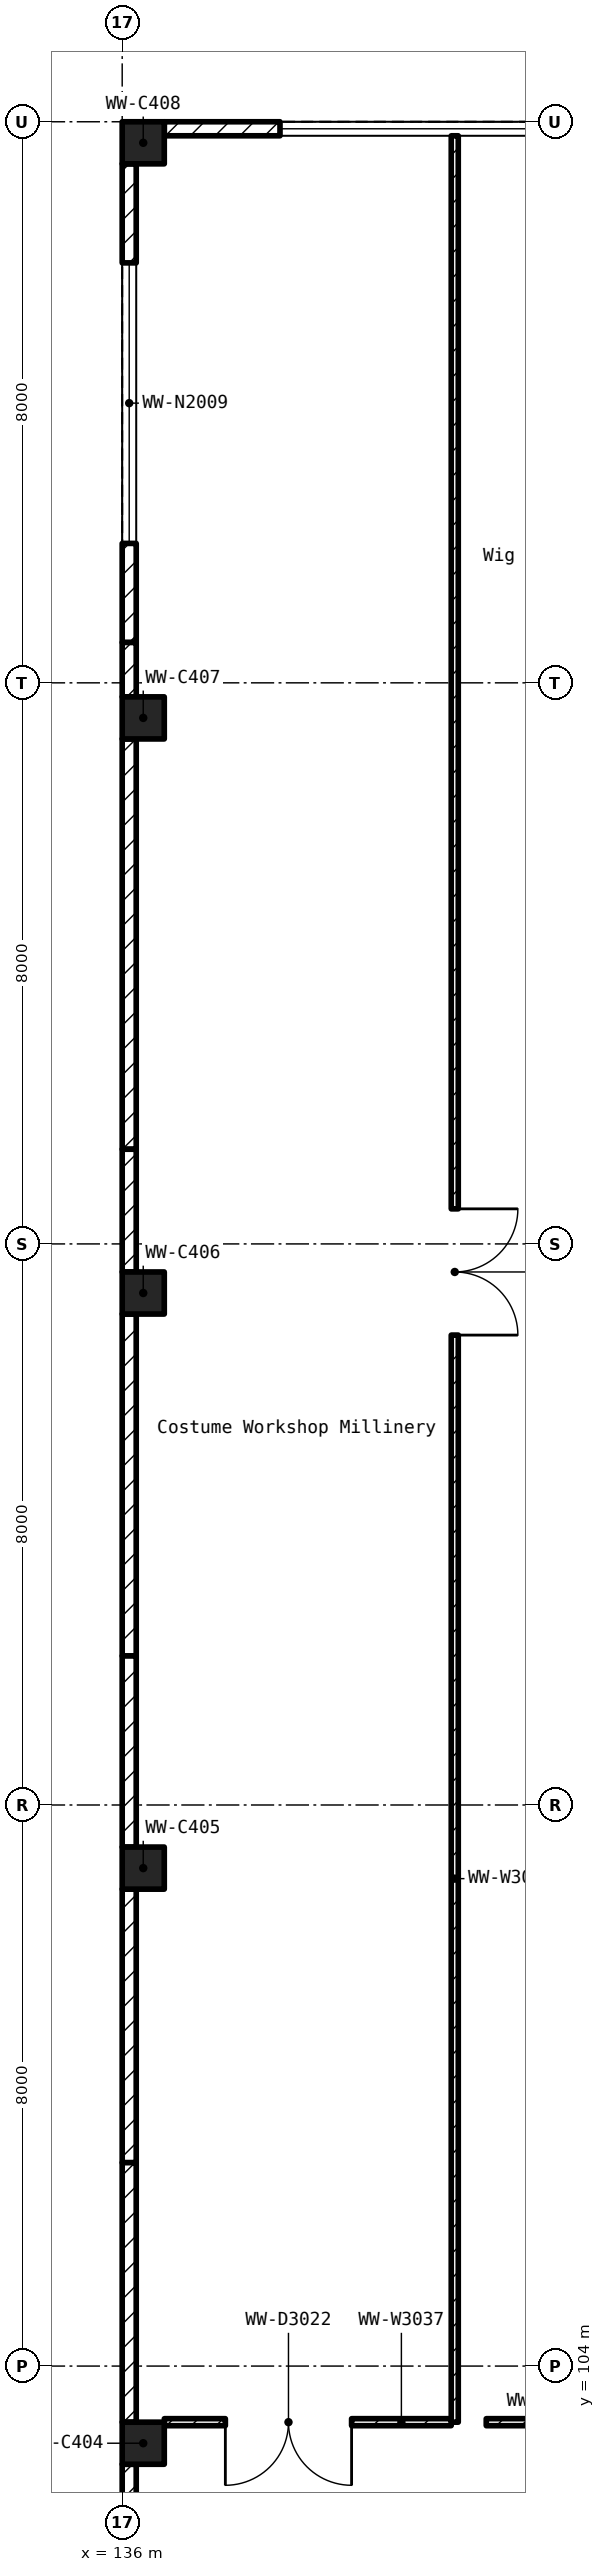
"""IFC4 building model, lengths in metres.
Left out: names, types, materials, properties, quantities, classifications, styles, units other than length and angle.
Written with IfcOpenShell. Run it as: python <this file> out.ifc"""

import sys

from ifc_helpers import new_model, si_unit, direction, frame, frame_2d, origin, origin_2d, place, context, subcontext, project, spatial, rectangle, extrude, element, fill, save


model = new_model("IFC4")
c1 = context("Model", 3, precision=1e-05, world=origin(), true_north=direction((0.0, 1.0)))
c2 = subcontext(c1, "Body", "Model", "MODEL_VIEW")
j1 = project(units=[si_unit("LENGTHUNIT", "METRE"), si_unit("PLANEANGLEUNIT", "RADIAN")], contexts=[c1])
p1 = place(None, origin())
s1 = spatial("IfcSite", under=j1, at=p1, CompositionType="ELEMENT")
p2 = place(p1, origin())
s2 = spatial("IfcBuilding", under=s1, at=p2, CompositionType="ELEMENT")
p3 = place(p2, frame((0.0, 0.0, 6.0)))
s3 = spatial("IfcBuildingStorey", under=s2, at=p3, CompositionType="ELEMENT", Elevation=6.0)
for number, where, z_axis, x_axis in (
    (1, (136.3, 102.9, 0.0), (0.0, 0.0, 1.0), (1.0, 0.0, 0.0)),
    (2, (136.3, 111.1, 0.0), (0.0, 0.0, 1.0), (1.0, 0.0, 0.0)),
    (3, (136.3, 119.3, 0.0), (0.0, 0.0, 1.0), (1.0, 0.0, 0.0)),
    (4, (136.3, 127.5, 0.0), (0.0, 0.0, 1.0), (1.0, 0.0, 0.0)),
    (5, (136.3, 135.7, 0.0), (0.0, 0.0, 1.0), (1.0, 0.0, 0.0)),
):
    element("IfcColumn", number, at=place(p3, frame(where, z_axis=z_axis, x_axis=x_axis)), inside=s3, PredefinedType="COLUMN", context=c2, shape_type="SweptSolid", body=[
        extrude(rectangle(XDim=0.6, YDim=0.6, at=origin_2d()), origin(), (0.0, 0.0, 1.0), 5.5),
    ])
p4 = place(p3, frame((143.9, 135.9, 0.0), z_axis=(0.0, 0.0, 1.0), x_axis=(-1.0, 0.0, 0.0)))
e6 = element("IfcWall", 6, at=p4, inside=s3, PredefinedType="SOLIDWALL", context=c2, shape_type="SweptSolid", body=[
    extrude(rectangle(XDim=7.3, YDim=0.2, at=frame_2d((3.65, 0.0))), origin(), (0.0, 0.0, 1.0), 4.55),
])
p5 = place(p4, frame((1.65, 0.0, 1.0)))
e7 = element("IfcOpeningElement", 7, at=p5, cuts=e6, PredefinedType="OPENING", context=c2, shape_type="SweptSolid", body=[
    extrude(rectangle(XDim=4.0, YDim=1.8, at=frame_2d((2.0, 0.9))), frame((0.0, 0.112, 0.0), z_axis=(0.0, -1.0, 0.0), x_axis=(1.0, 0.0, 0.0)), (0.0, 0.0, 1.0), 0.224),
])
p6 = place(p3, frame((136.1, 135.4, 0.0), z_axis=(0.0, 0.0, 1.0), x_axis=(0.0, -1.0, 0.0)))
e8 = element("IfcWall", 8, at=p6, inside=s3, PredefinedType="SOLIDWALL", context=c2, shape_type="SweptSolid", body=[
    extrude(rectangle(XDim=6.825, YDim=0.2, at=frame_2d((3.413, 0.0))), origin(), (0.0, 0.0, 1.0), 4.55),
])
p7 = place(p6, frame((1.412, 0.0, 1.0)))
e9 = element("IfcOpeningElement", 9, at=p7, cuts=e8, PredefinedType="OPENING", context=c2, shape_type="SweptSolid", body=[
    extrude(rectangle(XDim=4.0, YDim=1.8, at=frame_2d((2.0, 0.9))), frame((0.0, 0.112, 0.0), z_axis=(0.0, -1.0, 0.0), x_axis=(1.0, 0.0, 0.0)), (0.0, 0.0, 1.0), 0.224),
])
p8 = place(p3, frame((136.1, 128.575, 0.0), z_axis=(0.0, 0.0, 1.0), x_axis=(0.0, -1.0, 0.0)))
e10 = element("IfcWall", 10, at=p8, inside=s3, PredefinedType="SOLIDWALL", context=c2, shape_type="SweptSolid", body=[
    extrude(rectangle(XDim=0.775, YDim=0.2, at=frame_2d((0.387, 0.0))), origin(), (0.0, 0.0, 1.0), 4.55),
])
p9 = place(p3, frame((136.1, 127.2, 0.0), z_axis=(0.0, 0.0, 1.0), x_axis=(0.0, -1.0, 0.0)))
e11 = element("IfcWall", 11, at=p9, inside=s3, PredefinedType="SOLIDWALL", context=c2, shape_type="SweptSolid", body=[
    extrude(rectangle(XDim=5.85, YDim=0.2, at=frame_2d((2.925, 0.0))), origin(), (0.0, 0.0, 1.0), 4.55),
])
p10 = place(p3, frame((136.1, 121.35, 0.0), z_axis=(0.0, 0.0, 1.0), x_axis=(0.0, -1.0, 0.0)))
e12 = element("IfcWall", 12, at=p10, inside=s3, PredefinedType="SOLIDWALL", context=c2, shape_type="SweptSolid", body=[
    extrude(rectangle(XDim=1.75, YDim=0.2, at=frame_2d((0.875, 0.0))), origin(), (0.0, 0.0, 1.0), 4.55),
])
p11 = place(p3, frame((136.1, 119.0, 0.0), z_axis=(0.0, 0.0, 1.0), x_axis=(0.0, -1.0, 0.0)))
e13 = element("IfcWall", 13, at=p11, inside=s3, PredefinedType="SOLIDWALL", context=c2, shape_type="SweptSolid", body=[
    extrude(rectangle(XDim=4.875, YDim=0.2, at=frame_2d((2.438, 0.0))), origin(), (0.0, 0.0, 1.0), 4.55),
])
p12 = place(p3, frame((136.1, 114.125, 0.0), z_axis=(0.0, 0.0, 1.0), x_axis=(0.0, -1.0, 0.0)))
e14 = element("IfcWall", 14, at=p12, inside=s3, PredefinedType="SOLIDWALL", context=c2, shape_type="SweptSolid", body=[
    extrude(rectangle(XDim=2.725, YDim=0.2, at=frame_2d((1.363, 0.0))), origin(), (0.0, 0.0, 1.0), 4.55),
])
p13 = place(p3, frame((136.1, 110.8, 0.0), z_axis=(0.0, 0.0, 1.0), x_axis=(0.0, -1.0, 0.0)))
e15 = element("IfcWall", 15, at=p13, inside=s3, PredefinedType="SOLIDWALL", context=c2, shape_type="SweptSolid", body=[
    extrude(rectangle(XDim=3.9, YDim=0.2, at=frame_2d((1.95, 0.0))), origin(), (0.0, 0.0, 1.0), 4.55),
])
p14 = place(p3, frame((136.1, 106.9, 0.0), z_axis=(0.0, 0.0, 1.0), x_axis=(0.0, -1.0, 0.0)))
e16 = element("IfcWall", 16, at=p14, inside=s3, PredefinedType="SOLIDWALL", context=c2, shape_type="SweptSolid", body=[
    extrude(rectangle(XDim=3.7, YDim=0.2, at=frame_2d((1.85, 0.0))), origin(), (0.0, 0.0, 1.0), 4.55),
])
p15 = place(p3, frame((136.1, 102.6, 0.0), z_axis=(0.0, 0.0, 1.0), x_axis=(0.0, -1.0, 0.0)))
e17 = element("IfcWall", 17, at=p15, inside=s3, PredefinedType="SOLIDWALL", context=c2, shape_type="SweptSolid", body=[
    extrude(rectangle(XDim=2.925, YDim=0.2, at=frame_2d((1.462, 0.0))), origin(), (0.0, 0.0, 1.0), 4.55),
])
p16 = place(p3, frame((140.742, 135.8, 0.0), z_axis=(0.0, 0.0, 1.0), x_axis=(0.0, -1.0, 0.0)))
e18 = element("IfcWall", 18, at=p16, inside=s3, PredefinedType="PARTITIONING", context=c2, shape_type="SweptSolid", body=[
    extrude(rectangle(XDim=32.6, YDim=0.1, at=frame_2d((16.3, 0.0))), origin(), (0.0, 0.0, 1.0), 4.45),
])
p17 = place(p16, frame((15.3, 0.0, 0.0)))
e19 = element("IfcOpeningElement", 19, at=p17, cuts=e18, PredefinedType="OPENING", context=c2, shape_type="SweptSolid", body=[
    extrude(rectangle(XDim=1.8, YDim=2.1, at=frame_2d((0.9, 1.05))), frame((0.0, 0.062, 0.0), z_axis=(0.0, -1.0, 0.0), x_axis=(1.0, 0.0, 0.0)), (0.0, 0.0, 1.0), 0.124),
])
p18 = place(p3, frame((140.691, 103.2, 0.0), z_axis=(0.0, 0.0, 1.0), x_axis=(-1.0, 0.0, 0.0)))
e20 = element("IfcWall", 20, at=p18, inside=s3, PredefinedType="PARTITIONING", context=c2, shape_type="SweptSolid", body=[
    extrude(rectangle(XDim=4.09, YDim=0.1, at=frame_2d((2.045, 0.0))), origin(), (0.0, 0.0, 1.0), 4.45),
])
p19 = place(p18, frame((1.42, 0.0, 0.0)))
e21 = element("IfcOpeningElement", 21, at=p19, cuts=e20, PredefinedType="OPENING", context=c2, shape_type="SweptSolid", body=[
    extrude(rectangle(XDim=1.8, YDim=2.1, at=frame_2d((0.9, 1.05))), frame((0.0, 0.062, 0.0), z_axis=(0.0, -1.0, 0.0), x_axis=(1.0, 0.0, 0.0)), (0.0, 0.0, 1.0), 0.124),
])
p20 = place(p3, frame((143.0, 103.2, 0.0), z_axis=(0.0, 0.0, 1.0), x_axis=(-1.0, 0.0, 0.0)))
e22 = element("IfcWall", 22, at=p20, inside=s3, PredefinedType="PARTITIONING", context=c2, shape_type="SweptSolid", body=[
    extrude(rectangle(XDim=1.809, YDim=0.1, at=frame_2d((0.905, 0.0))), origin(), (0.0, 0.0, 1.0), 4.45),
])
p21 = place(p5, origin())
e23 = element("IfcWindow", 23, at=p21, inside=s3, PartitioningType="DOUBLE_PANEL_VERTICAL", PredefinedType="WINDOW", context=c2, shape_type="SweptSolid", body=[
    extrude(rectangle(XDim=4.0, YDim=1.8, at=frame_2d((2.0, 0.9))), frame((0.0, 0.03, 0.0), z_axis=(0.0, -1.0, 0.0), x_axis=(1.0, 0.0, 0.0)), (0.0, 0.0, 1.0), 0.06),
])
fill(e7, e23)
p22 = place(p7, origin())
e24 = element("IfcWindow", 24, at=p22, inside=s3, PartitioningType="DOUBLE_PANEL_VERTICAL", PredefinedType="WINDOW", context=c2, shape_type="SweptSolid", body=[
    extrude(rectangle(XDim=4.0, YDim=1.8, at=frame_2d((2.0, 0.9))), frame((0.0, 0.03, 0.0), z_axis=(0.0, -1.0, 0.0), x_axis=(1.0, 0.0, 0.0)), (0.0, 0.0, 1.0), 0.06),
])
fill(e9, e24)
p23 = place(p19, origin())
e25 = element("IfcDoor", 25, at=p23, inside=s3, OperationType="DOUBLE_DOOR_SINGLE_SWING", PredefinedType="DOOR", context=c2, shape_type="SweptSolid", body=[
    extrude(rectangle(XDim=1.8, YDim=2.1, at=frame_2d((0.9, 1.05))), frame((0.0, 0.025, 0.0), z_axis=(0.0, -1.0, 0.0), x_axis=(1.0, 0.0, 0.0)), (0.0, 0.0, 1.0), 0.05),
])
fill(e21, e25)
p24 = place(p17, origin())
e26 = element("IfcDoor", 26, at=p24, inside=s3, OperationType="DOUBLE_DOOR_SINGLE_SWING", PredefinedType="DOOR", context=c2, shape_type="SweptSolid", body=[
    extrude(rectangle(XDim=1.8, YDim=2.1, at=frame_2d((0.9, 1.05))), frame((0.0, 0.025, 0.0), z_axis=(0.0, -1.0, 0.0), x_axis=(1.0, 0.0, 0.0)), (0.0, 0.0, 1.0), 0.05),
])
fill(e19, e26)
save(model, sys.argv[1])
